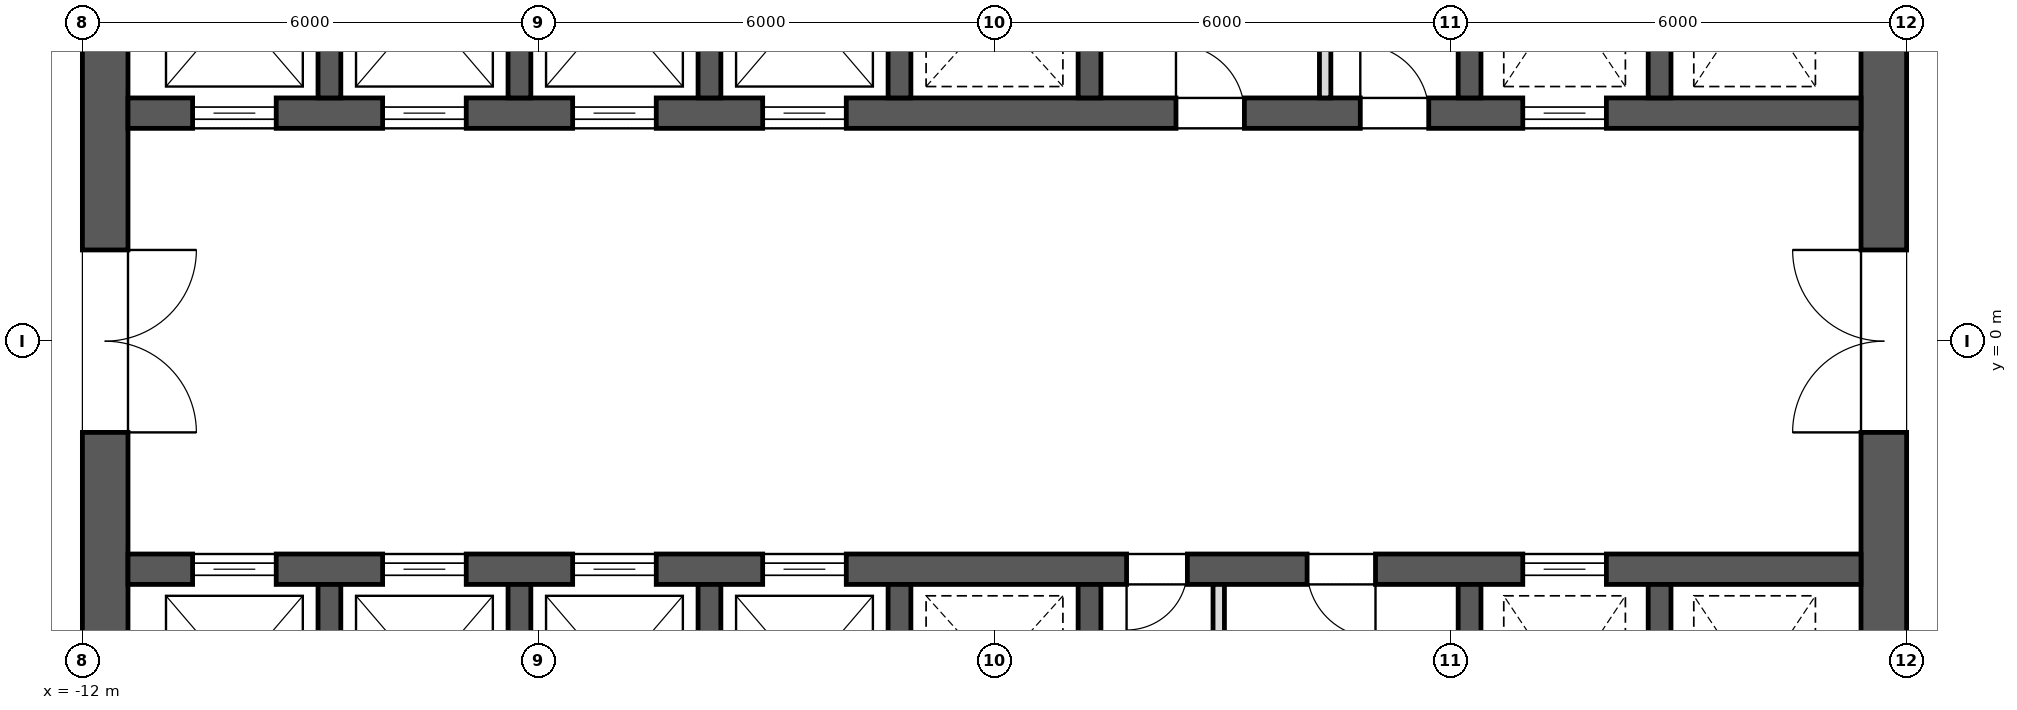
"""IFC4 building model, lengths in metres.
Left out: names, types, materials, properties, quantities, classifications, styles, units other than length and angle.
Written with IfcOpenShell. Run it as: python <this file> out.ifc"""

import sys

from ifc_helpers import new_model, si_unit, direction, frame, frame_2d, origin, place, context, subcontext, project, spatial, rectangle, extrude, element, fill, save


model = new_model("IFC4")
c1 = context("Model", 3, precision=1e-05, world=origin(), true_north=direction((0.0, 1.0)))
c2 = subcontext(c1, "Body", "Model", "MODEL_VIEW")
j1 = project(units=[si_unit("LENGTHUNIT", "METRE"), si_unit("PLANEANGLEUNIT", "RADIAN")], contexts=[c1])
p1 = place(None, origin())
s1 = spatial("IfcSite", under=j1, at=p1, CompositionType="ELEMENT")
p2 = place(p1, origin())
s2 = spatial("IfcBuilding", under=s1, at=p2, CompositionType="ELEMENT")
p3 = place(p2, frame((0.0, 0.0, 234.9)))
s3 = spatial("IfcBuildingStorey", under=s2, at=p3, CompositionType="ELEMENT", Elevation=234.9)
p4 = place(p3, frame((11.7, -11.4, 0.0), z_axis=(0.0, 0.0, 1.0), x_axis=(0.0, 1.0, 0.0)))
e1 = element("IfcWall", 1, at=p4, inside=s3, PredefinedType="SHEAR", context=c2, shape_type="SweptSolid", body=[
    extrude(rectangle(XDim=22.8, YDim=0.6, at=frame_2d((11.4, 0.0))), origin(), (0.0, 0.0, 1.0), 4.0),
])
p5 = place(p4, frame((10.2, 0.0, 0.0)))
e2 = element("IfcOpeningElement", 2, at=p5, cuts=e1, PredefinedType="OPENING", context=c2, shape_type="SweptSolid", body=[
    extrude(rectangle(XDim=2.4, YDim=2.1, at=frame_2d((1.2, 1.05))), frame((0.0, 0.312, 0.0), z_axis=(0.0, -1.0, 0.0), x_axis=(1.0, 0.0, 0.0)), (0.0, 0.0, 1.0), 0.624),
])
p6 = place(p4, frame((19.5, 0.0, 0.0)))
e3 = element("IfcOpeningElement", 3, at=p6, cuts=e1, PredefinedType="OPENING", context=c2, shape_type="SweptSolid", body=[
    extrude(rectangle(XDim=1.2, YDim=2.1, at=frame_2d((0.6, 1.05))), frame((0.0, 0.312, 0.0), z_axis=(0.0, -1.0, 0.0), x_axis=(1.0, 0.0, 0.0)), (0.0, 0.0, 1.0), 0.624),
])
p7 = place(p4, frame((2.1, 0.0, 0.0)))
e4 = element("IfcOpeningElement", 4, at=p7, cuts=e1, PredefinedType="OPENING", context=c2, shape_type="SweptSolid", body=[
    extrude(rectangle(XDim=1.2, YDim=2.1, at=frame_2d((0.6, 1.05))), frame((0.0, 0.312, 0.0), z_axis=(0.0, -1.0, 0.0), x_axis=(1.0, 0.0, 0.0)), (0.0, 0.0, 1.0), 0.624),
])
p8 = place(p3, frame((-11.7, -11.4, 0.0), z_axis=(0.0, 0.0, 1.0), x_axis=(0.0, 1.0, 0.0)))
e5 = element("IfcWall", 5, at=p8, inside=s3, PredefinedType="SHEAR", context=c2, shape_type="SweptSolid", body=[
    extrude(rectangle(XDim=22.8, YDim=0.6, at=frame_2d((11.4, 0.0))), origin(), (0.0, 0.0, 1.0), 4.0),
])
p9 = place(p8, frame((10.2, 0.0, 0.0)))
e6 = element("IfcOpeningElement", 6, at=p9, cuts=e5, PredefinedType="OPENING", context=c2, shape_type="SweptSolid", body=[
    extrude(rectangle(XDim=2.4, YDim=2.1, at=frame_2d((1.2, 1.05))), frame((0.0, 0.312, 0.0), z_axis=(0.0, -1.0, 0.0), x_axis=(1.0, 0.0, 0.0)), (0.0, 0.0, 1.0), 0.624),
])
p10 = place(p8, frame((18.925, 0.0, 0.0)))
e7 = element("IfcOpeningElement", 7, at=p10, cuts=e5, PredefinedType="OPENING", context=c2, shape_type="SweptSolid", body=[
    extrude(rectangle(XDim=1.2, YDim=2.1, at=frame_2d((0.6, 1.05))), frame((0.0, 0.312, 0.0), z_axis=(0.0, -1.0, 0.0), x_axis=(1.0, 0.0, 0.0)), (0.0, 0.0, 1.0), 0.624),
])
p11 = place(p8, frame((2.675, 0.0, 0.0)))
e8 = element("IfcOpeningElement", 8, at=p11, cuts=e5, PredefinedType="OPENING", context=c2, shape_type="SweptSolid", body=[
    extrude(rectangle(XDim=1.2, YDim=2.1, at=frame_2d((0.6, 1.05))), frame((0.0, 0.312, 0.0), z_axis=(0.0, -1.0, 0.0), x_axis=(1.0, 0.0, 0.0)), (0.0, 0.0, 1.0), 0.624),
])
p12 = place(p3, frame((-11.4, 3.0, 0.0), z_axis=(0.0, 0.0, 1.0), x_axis=(1.0, 0.0, 0.0)))
e9 = element("IfcWall", 9, at=p12, inside=s3, PredefinedType="SHEAR", context=c2, shape_type="SweptSolid", body=[
    extrude(rectangle(XDim=22.8, YDim=0.4, at=frame_2d((11.4, 0.0))), origin(), (0.0, 0.0, 1.0), 4.0),
])
p13 = place(p12, frame((0.85, 0.0, 0.0)))
e10 = element("IfcOpeningElement", 10, at=p13, cuts=e9, PredefinedType="OPENING", context=c2, shape_type="SweptSolid", body=[
    extrude(rectangle(XDim=1.1, YDim=2.1, at=frame_2d((0.55, 1.05))), frame((0.0, 0.212, 0.0), z_axis=(0.0, -1.0, 0.0), x_axis=(1.0, 0.0, 0.0)), (0.0, 0.0, 1.0), 0.424),
])
p14 = place(p12, frame((3.35, 0.0, 0.0)))
e11 = element("IfcOpeningElement", 11, at=p14, cuts=e9, PredefinedType="OPENING", context=c2, shape_type="SweptSolid", body=[
    extrude(rectangle(XDim=1.1, YDim=2.1, at=frame_2d((0.55, 1.05))), frame((0.0, 0.212, 0.0), z_axis=(0.0, -1.0, 0.0), x_axis=(1.0, 0.0, 0.0)), (0.0, 0.0, 1.0), 0.424),
])
p15 = place(p12, frame((5.85, 0.0, 0.0)))
e12 = element("IfcOpeningElement", 12, at=p15, cuts=e9, PredefinedType="OPENING", context=c2, shape_type="SweptSolid", body=[
    extrude(rectangle(XDim=1.1, YDim=2.1, at=frame_2d((0.55, 1.05))), frame((0.0, 0.212, 0.0), z_axis=(0.0, -1.0, 0.0), x_axis=(1.0, 0.0, 0.0)), (0.0, 0.0, 1.0), 0.424),
])
p16 = place(p12, frame((8.35, 0.0, 0.0)))
e13 = element("IfcOpeningElement", 13, at=p16, cuts=e9, PredefinedType="OPENING", context=c2, shape_type="SweptSolid", body=[
    extrude(rectangle(XDim=1.1, YDim=2.1, at=frame_2d((0.55, 1.05))), frame((0.0, 0.212, 0.0), z_axis=(0.0, -1.0, 0.0), x_axis=(1.0, 0.0, 0.0)), (0.0, 0.0, 1.0), 0.424),
])
p17 = place(p12, frame((18.35, 0.0, 0.0)))
e14 = element("IfcOpeningElement", 14, at=p17, cuts=e9, PredefinedType="OPENING", context=c2, shape_type="SweptSolid", body=[
    extrude(rectangle(XDim=1.1, YDim=2.1, at=frame_2d((0.55, 1.05))), frame((0.0, 0.212, 0.0), z_axis=(0.0, -1.0, 0.0), x_axis=(1.0, 0.0, 0.0)), (0.0, 0.0, 1.0), 0.424),
])
p18 = place(p12, frame((13.788, 0.0, 0.0)))
e15 = element("IfcOpeningElement", 15, at=p18, cuts=e9, PredefinedType="OPENING", context=c2, shape_type="SweptSolid", body=[
    extrude(rectangle(XDim=0.9, YDim=2.1, at=frame_2d((0.45, 1.05))), frame((0.0, 0.212, 0.0), z_axis=(0.0, -1.0, 0.0), x_axis=(1.0, 0.0, 0.0)), (0.0, 0.0, 1.0), 0.424),
])
p19 = place(p12, frame((16.212, 0.0, 0.0)))
e16 = element("IfcOpeningElement", 16, at=p19, cuts=e9, PredefinedType="OPENING", context=c2, shape_type="SweptSolid", body=[
    extrude(rectangle(XDim=0.9, YDim=2.1, at=frame_2d((0.45, 1.05))), frame((0.0, 0.212, 0.0), z_axis=(0.0, -1.0, 0.0), x_axis=(1.0, 0.0, 0.0)), (0.0, 0.0, 1.0), 0.424),
])
for number, where, z_axis, x_axis in (
    (17, (-8.75, 3.2, 0.0), (0.0, 0.0, 1.0), (0.0, 1.0, 0.0)),
    (18, (-6.25, 3.2, 0.0), (0.0, 0.0, 1.0), (0.0, 1.0, 0.0)),
    (19, (-3.75, 3.2, 0.0), (0.0, 0.0, 1.0), (0.0, 1.0, 0.0)),
    (20, (-1.25, 3.2, 0.0), (0.0, 0.0, 1.0), (0.0, 1.0, 0.0)),
    (21, (1.25, 3.2, 0.0), (0.0, 0.0, 1.0), (0.0, 1.0, 0.0)),
    (22, (6.25, 3.2, 0.0), (0.0, 0.0, 1.0), (0.0, 1.0, 0.0)),
    (23, (8.75, 3.2, 0.0), (0.0, 0.0, 1.0), (0.0, 1.0, 0.0)),
):
    element("IfcWall", number, at=place(p3, frame(where, z_axis=z_axis, x_axis=x_axis)), inside=s3, PredefinedType="SHEAR", context=c2, shape_type="SweptSolid", body=[
        extrude(rectangle(XDim=2.9, YDim=0.3, at=frame_2d((1.45, 0.0))), origin(), (0.0, 0.0, 1.0), 4.0),
    ])
p20 = place(p3, frame((-11.4, -3.0, 0.0), z_axis=(0.0, 0.0, 1.0), x_axis=(1.0, 0.0, 0.0)))
e24 = element("IfcWall", 24, at=p20, inside=s3, PredefinedType="SHEAR", context=c2, shape_type="SweptSolid", body=[
    extrude(rectangle(XDim=22.8, YDim=0.4, at=frame_2d((11.4, 0.0))), origin(), (0.0, 0.0, 1.0), 4.0),
])
p21 = place(p20, frame((0.85, 0.0, 0.0)))
e25 = element("IfcOpeningElement", 25, at=p21, cuts=e24, PredefinedType="OPENING", context=c2, shape_type="SweptSolid", body=[
    extrude(rectangle(XDim=1.1, YDim=2.1, at=frame_2d((0.55, 1.05))), frame((0.0, 0.212, 0.0), z_axis=(0.0, -1.0, 0.0), x_axis=(1.0, 0.0, 0.0)), (0.0, 0.0, 1.0), 0.424),
])
p22 = place(p20, frame((3.35, 0.0, 0.0)))
e26 = element("IfcOpeningElement", 26, at=p22, cuts=e24, PredefinedType="OPENING", context=c2, shape_type="SweptSolid", body=[
    extrude(rectangle(XDim=1.1, YDim=2.1, at=frame_2d((0.55, 1.05))), frame((0.0, 0.212, 0.0), z_axis=(0.0, -1.0, 0.0), x_axis=(1.0, 0.0, 0.0)), (0.0, 0.0, 1.0), 0.424),
])
p23 = place(p20, frame((5.85, 0.0, 0.0)))
e27 = element("IfcOpeningElement", 27, at=p23, cuts=e24, PredefinedType="OPENING", context=c2, shape_type="SweptSolid", body=[
    extrude(rectangle(XDim=1.1, YDim=2.1, at=frame_2d((0.55, 1.05))), frame((0.0, 0.212, 0.0), z_axis=(0.0, -1.0, 0.0), x_axis=(1.0, 0.0, 0.0)), (0.0, 0.0, 1.0), 0.424),
])
p24 = place(p20, frame((8.35, 0.0, 0.0)))
e28 = element("IfcOpeningElement", 28, at=p24, cuts=e24, PredefinedType="OPENING", context=c2, shape_type="SweptSolid", body=[
    extrude(rectangle(XDim=1.1, YDim=2.1, at=frame_2d((0.55, 1.05))), frame((0.0, 0.212, 0.0), z_axis=(0.0, -1.0, 0.0), x_axis=(1.0, 0.0, 0.0)), (0.0, 0.0, 1.0), 0.424),
])
p25 = place(p20, frame((18.35, 0.0, 0.0)))
e29 = element("IfcOpeningElement", 29, at=p25, cuts=e24, PredefinedType="OPENING", context=c2, shape_type="SweptSolid", body=[
    extrude(rectangle(XDim=1.1, YDim=2.1, at=frame_2d((0.55, 1.05))), frame((0.0, 0.212, 0.0), z_axis=(0.0, -1.0, 0.0), x_axis=(1.0, 0.0, 0.0)), (0.0, 0.0, 1.0), 0.424),
])
p26 = place(p20, frame((13.137, 0.0, 0.0)))
e30 = element("IfcOpeningElement", 30, at=p26, cuts=e24, PredefinedType="OPENING", context=c2, shape_type="SweptSolid", body=[
    extrude(rectangle(XDim=0.8, YDim=2.1, at=frame_2d((0.4, 1.05))), frame((0.0, 0.212, 0.0), z_axis=(0.0, -1.0, 0.0), x_axis=(1.0, 0.0, 0.0)), (0.0, 0.0, 1.0), 0.424),
])
p27 = place(p20, frame((15.512, 0.0, 0.0)))
e31 = element("IfcOpeningElement", 31, at=p27, cuts=e24, PredefinedType="OPENING", context=c2, shape_type="SweptSolid", body=[
    extrude(rectangle(XDim=0.9, YDim=2.1, at=frame_2d((0.45, 1.05))), frame((0.0, 0.212, 0.0), z_axis=(0.0, -1.0, 0.0), x_axis=(1.0, 0.0, 0.0)), (0.0, 0.0, 1.0), 0.424),
])
for number, where, z_axis, x_axis in (
    (32, (-8.75, -6.1, 0.0), (0.0, 0.0, 1.0), (0.0, 1.0, 0.0)),
    (33, (-6.25, -6.1, 0.0), (0.0, 0.0, 1.0), (0.0, 1.0, 0.0)),
    (34, (-3.75, -6.1, 0.0), (0.0, 0.0, 1.0), (0.0, 1.0, 0.0)),
    (35, (-1.25, -6.1, 0.0), (0.0, 0.0, 1.0), (0.0, 1.0, 0.0)),
    (36, (1.25, -6.1, 0.0), (0.0, 0.0, 1.0), (0.0, 1.0, 0.0)),
    (37, (6.25, -6.1, 0.0), (0.0, 0.0, 1.0), (0.0, 1.0, 0.0)),
    (38, (8.75, -6.1, 0.0), (0.0, 0.0, 1.0), (0.0, 1.0, 0.0)),
):
    element("IfcWall", number, at=place(p3, frame(where, z_axis=z_axis, x_axis=x_axis)), inside=s3, PredefinedType="SHEAR", context=c2, shape_type="SweptSolid", body=[
        extrude(rectangle(XDim=2.9, YDim=0.3, at=frame_2d((1.45, 0.0))), origin(), (0.0, 0.0, 1.0), 4.0),
    ])
for number, where, z_axis, x_axis in (
    (39, (4.35, 3.2, 0.0), (0.0, 0.0, 1.0), (0.0, 1.0, 0.0)),
    (40, (2.95, -6.1, 0.0), (0.0, 0.0, 1.0), (0.0, 1.0, 0.0)),
):
    element("IfcWall", number, at=place(p3, frame(where, z_axis=z_axis, x_axis=x_axis)), inside=s3, PredefinedType="PARTITIONING", context=c2, shape_type="SweptSolid", body=[
        extrude(rectangle(XDim=2.9, YDim=0.15, at=frame_2d((1.45, 0.0))), origin(), (0.0, 0.0, 1.0), 3.7),
    ])
p28 = place(p13, origin())
e41 = element("IfcDoor", 41, at=p28, inside=s3, OperationType="SLIDING_TO_LEFT", PredefinedType="DOOR", context=c2, shape_type="SweptSolid", body=[
    extrude(rectangle(XDim=1.1, YDim=2.1, at=frame_2d((0.55, 1.05))), frame((0.0, 0.025, 0.0), z_axis=(0.0, -1.0, 0.0), x_axis=(1.0, 0.0, 0.0)), (0.0, 0.0, 1.0), 0.05),
])
fill(e10, e41)
p29 = place(p14, origin())
e42 = element("IfcDoor", 42, at=p29, inside=s3, OperationType="SLIDING_TO_LEFT", PredefinedType="DOOR", context=c2, shape_type="SweptSolid", body=[
    extrude(rectangle(XDim=1.1, YDim=2.1, at=frame_2d((0.55, 1.05))), frame((0.0, 0.025, 0.0), z_axis=(0.0, -1.0, 0.0), x_axis=(1.0, 0.0, 0.0)), (0.0, 0.0, 1.0), 0.05),
])
fill(e11, e42)
p30 = place(p21, origin())
e43 = element("IfcDoor", 43, at=p30, inside=s3, OperationType="SLIDING_TO_LEFT", PredefinedType="DOOR", context=c2, shape_type="SweptSolid", body=[
    extrude(rectangle(XDim=1.1, YDim=2.1, at=frame_2d((0.55, 1.05))), frame((0.0, 0.025, 0.0), z_axis=(0.0, -1.0, 0.0), x_axis=(1.0, 0.0, 0.0)), (0.0, 0.0, 1.0), 0.05),
])
fill(e25, e43)
p31 = place(p22, origin())
e44 = element("IfcDoor", 44, at=p31, inside=s3, OperationType="SLIDING_TO_LEFT", PredefinedType="DOOR", context=c2, shape_type="SweptSolid", body=[
    extrude(rectangle(XDim=1.1, YDim=2.1, at=frame_2d((0.55, 1.05))), frame((0.0, 0.025, 0.0), z_axis=(0.0, -1.0, 0.0), x_axis=(1.0, 0.0, 0.0)), (0.0, 0.0, 1.0), 0.05),
])
fill(e26, e44)
p32 = place(p15, origin())
e45 = element("IfcDoor", 45, at=p32, inside=s3, OperationType="SLIDING_TO_LEFT", PredefinedType="DOOR", context=c2, shape_type="SweptSolid", body=[
    extrude(rectangle(XDim=1.1, YDim=2.1, at=frame_2d((0.55, 1.05))), frame((0.0, 0.025, 0.0), z_axis=(0.0, -1.0, 0.0), x_axis=(1.0, 0.0, 0.0)), (0.0, 0.0, 1.0), 0.05),
])
fill(e12, e45)
p33 = place(p16, origin())
e46 = element("IfcDoor", 46, at=p33, inside=s3, OperationType="SLIDING_TO_LEFT", PredefinedType="DOOR", context=c2, shape_type="SweptSolid", body=[
    extrude(rectangle(XDim=1.1, YDim=2.1, at=frame_2d((0.55, 1.05))), frame((0.0, 0.025, 0.0), z_axis=(0.0, -1.0, 0.0), x_axis=(1.0, 0.0, 0.0)), (0.0, 0.0, 1.0), 0.05),
])
fill(e13, e46)
p34 = place(p23, origin())
e47 = element("IfcDoor", 47, at=p34, inside=s3, OperationType="SLIDING_TO_LEFT", PredefinedType="DOOR", context=c2, shape_type="SweptSolid", body=[
    extrude(rectangle(XDim=1.1, YDim=2.1, at=frame_2d((0.55, 1.05))), frame((0.0, 0.025, 0.0), z_axis=(0.0, -1.0, 0.0), x_axis=(1.0, 0.0, 0.0)), (0.0, 0.0, 1.0), 0.05),
])
fill(e27, e47)
p35 = place(p24, origin())
e48 = element("IfcDoor", 48, at=p35, inside=s3, OperationType="SLIDING_TO_LEFT", PredefinedType="DOOR", context=c2, shape_type="SweptSolid", body=[
    extrude(rectangle(XDim=1.1, YDim=2.1, at=frame_2d((0.55, 1.05))), frame((0.0, 0.025, 0.0), z_axis=(0.0, -1.0, 0.0), x_axis=(1.0, 0.0, 0.0)), (0.0, 0.0, 1.0), 0.05),
])
fill(e28, e48)
p36 = place(p17, origin())
e49 = element("IfcDoor", 49, at=p36, inside=s3, OperationType="SLIDING_TO_LEFT", PredefinedType="DOOR", context=c2, shape_type="SweptSolid", body=[
    extrude(rectangle(XDim=1.1, YDim=2.1, at=frame_2d((0.55, 1.05))), frame((0.0, 0.025, 0.0), z_axis=(0.0, -1.0, 0.0), x_axis=(1.0, 0.0, 0.0)), (0.0, 0.0, 1.0), 0.05),
])
fill(e14, e49)
p37 = place(p25, origin())
e50 = element("IfcDoor", 50, at=p37, inside=s3, OperationType="SLIDING_TO_LEFT", PredefinedType="DOOR", context=c2, shape_type="SweptSolid", body=[
    extrude(rectangle(XDim=1.1, YDim=2.1, at=frame_2d((0.55, 1.05))), frame((0.0, 0.025, 0.0), z_axis=(0.0, -1.0, 0.0), x_axis=(1.0, 0.0, 0.0)), (0.0, 0.0, 1.0), 0.05),
])
fill(e29, e50)
p38 = place(p9, frame((2.4, 0.0, 0.0), z_axis=(0.0, 0.0, 1.0), x_axis=(-1.0, 0.0, 0.0)))
e51 = element("IfcDoor", 51, at=p38, inside=s3, OperationType="DOUBLE_DOOR_SINGLE_SWING", PredefinedType="DOOR", context=c2, shape_type="SweptSolid", body=[
    extrude(rectangle(XDim=2.4, YDim=2.1, at=frame_2d((1.2, 1.05))), frame((0.0, 0.025, 0.0), z_axis=(0.0, -1.0, 0.0), x_axis=(1.0, 0.0, 0.0)), (0.0, 0.0, 1.0), 0.05),
])
fill(e6, e51)
p39 = place(p5, origin())
e52 = element("IfcDoor", 52, at=p39, inside=s3, OperationType="DOUBLE_DOOR_SINGLE_SWING", PredefinedType="DOOR", context=c2, shape_type="SweptSolid", body=[
    extrude(rectangle(XDim=2.4, YDim=2.1, at=frame_2d((1.2, 1.05))), frame((0.0, 0.025, 0.0), z_axis=(0.0, -1.0, 0.0), x_axis=(1.0, 0.0, 0.0)), (0.0, 0.0, 1.0), 0.05),
])
fill(e2, e52)
p40 = place(p18, origin())
e53 = element("IfcDoor", 53, at=p40, inside=s3, OperationType="SINGLE_SWING_RIGHT", PredefinedType="DOOR", context=c2, shape_type="SweptSolid", body=[
    extrude(rectangle(XDim=0.9, YDim=2.1, at=frame_2d((0.45, 1.05))), frame((0.0, 0.025, 0.0), z_axis=(0.0, -1.0, 0.0), x_axis=(1.0, 0.0, 0.0)), (0.0, 0.0, 1.0), 0.05),
])
fill(e15, e53)
p41 = place(p19, origin())
e54 = element("IfcDoor", 54, at=p41, inside=s3, OperationType="SINGLE_SWING_RIGHT", PredefinedType="DOOR", context=c2, shape_type="SweptSolid", body=[
    extrude(rectangle(XDim=0.9, YDim=2.1, at=frame_2d((0.45, 1.05))), frame((0.0, 0.025, 0.0), z_axis=(0.0, -1.0, 0.0), x_axis=(1.0, 0.0, 0.0)), (0.0, 0.0, 1.0), 0.05),
])
fill(e16, e54)
p42 = place(p26, frame((0.8, 0.0, 0.0), z_axis=(0.0, 0.0, 1.0), x_axis=(-1.0, 0.0, 0.0)))
e55 = element("IfcDoor", 55, at=p42, inside=s3, OperationType="SINGLE_SWING_LEFT", PredefinedType="DOOR", context=c2, shape_type="SweptSolid", body=[
    extrude(rectangle(XDim=0.8, YDim=2.1, at=frame_2d((0.4, 1.05))), frame((0.0, 0.025, 0.0), z_axis=(0.0, -1.0, 0.0), x_axis=(1.0, 0.0, 0.0)), (0.0, 0.0, 1.0), 0.05),
])
fill(e30, e55)
p43 = place(p27, frame((0.9, 0.0, 0.0), z_axis=(0.0, 0.0, 1.0), x_axis=(-1.0, 0.0, 0.0)))
e56 = element("IfcDoor", 56, at=p43, inside=s3, OperationType="SINGLE_SWING_RIGHT", PredefinedType="DOOR", context=c2, shape_type="SweptSolid", body=[
    extrude(rectangle(XDim=0.9, YDim=2.1, at=frame_2d((0.45, 1.05))), frame((0.0, 0.025, 0.0), z_axis=(0.0, -1.0, 0.0), x_axis=(1.0, 0.0, 0.0)), (0.0, 0.0, 1.0), 0.05),
])
fill(e31, e56)
save(model, sys.argv[1])
